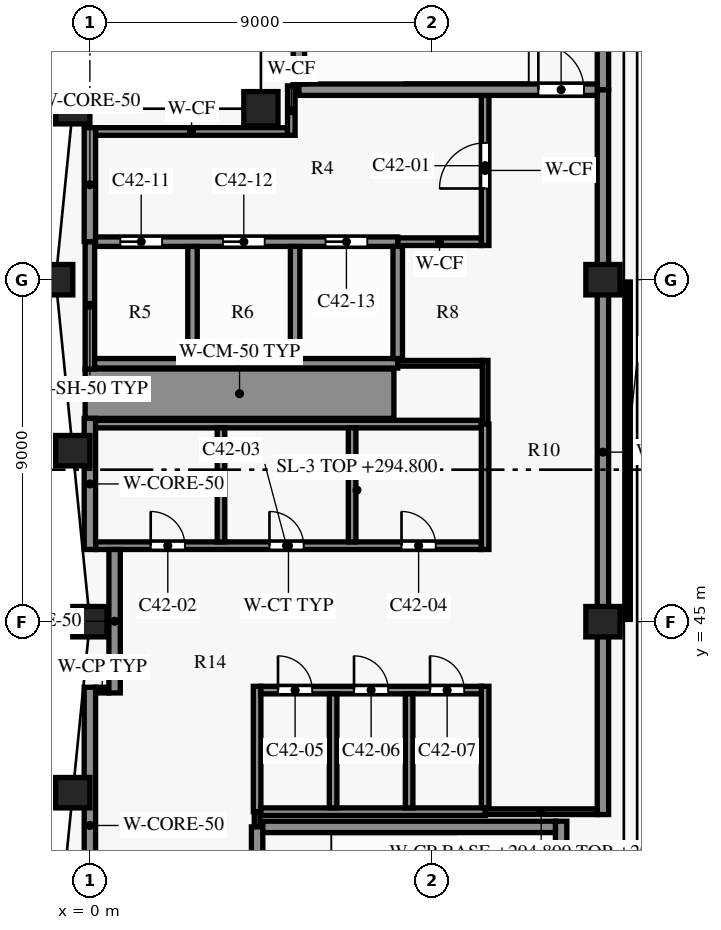
"""IFC4 building model, lengths in metres.
Left out: names, types, materials, properties, quantities, classifications, styles, units other than length and angle.
Written with IfcOpenShell. Run it as: python <this file> out.ifc"""

import sys

from ifc_helpers import new_model, si_unit, direction, frame, frame_2d, origin, origin_2d, place, context, subcontext, project, spatial, rectangle, extrude, element, fill, save


model = new_model("IFC4")
c1 = context("Model", 3, precision=1e-05, world=origin(), true_north=direction((0.0, 1.0)))
c2 = subcontext(c1, "Body", "Model", "MODEL_VIEW")
j1 = project(units=[si_unit("LENGTHUNIT", "METRE"), si_unit("PLANEANGLEUNIT", "RADIAN")], contexts=[c1])
p1 = place(None, origin())
s1 = spatial("IfcSite", under=j1, at=p1, CompositionType="ELEMENT")
p2 = place(p1, origin())
s2 = spatial("IfcBuilding", under=s1, at=p2, CompositionType="ELEMENT")
p3 = place(p2, frame((0.0, 0.0, 294.8)))
s3 = spatial("IfcBuildingStorey", under=s2, at=p3, CompositionType="ELEMENT", Elevation=294.8)
for number, where, z_axis, x_axis in (
    (1, (13.5, 45.0, 0.0), (0.0, 0.0, 1.0), (1.0, 0.0, 0.0)),
    (2, (13.5, 54.0, 0.0), (0.0, 0.0, 1.0), (1.0, 0.0, 0.0)),
    (3, (-0.45, 58.5, 0.0), (0.0, 0.0, 1.0), (-0.1, -0.995, 0.0)),
    (4, (-0.9, 54.0, 0.0), (0.0, 0.0, 1.0), (0.0, -1.0, 0.0)),
    (5, (-0.45, 49.5, 0.0), (0.0, 0.0, 1.0), (0.1, -0.995, 0.0)),
    (6, (0.0, 45.0, 0.0), (0.0, 0.0, 1.0), (0.0, -1.0, 0.0)),
    (7, (-0.45, 40.5, 0.0), (0.0, 0.0, 1.0), (-0.1, -0.995, 0.0)),
):
    element("IfcColumn", number, at=place(p3, frame(where, z_axis=z_axis, x_axis=x_axis)), inside=s3, PredefinedType="COLUMN", context=c2, shape_type="SweptSolid", body=[
        extrude(rectangle(XDim=0.9, YDim=0.8, at=origin_2d()), origin(), (0.0, 0.0, 1.0), 4.0),
    ])
p4 = place(p3, frame((4.5, 58.5, 0.0), z_axis=(0.0, 0.0, 1.0), x_axis=(1.0, 0.0, 0.0)))
e8 = element("IfcColumn", 8, at=p4, inside=s3, PredefinedType="COLUMN", context=c2, shape_type="SweptSolid", body=[
    extrude(rectangle(XDim=0.9, YDim=0.9, at=origin_2d()), origin(), (0.0, 0.0, 1.0), 4.0),
])
p5 = place(p3, frame((4.55, 39.6, 0.0), z_axis=(0.0, 0.0, 1.0), x_axis=(1.0, 0.0, 0.0)))
e9 = element("IfcWall", 9, at=p5, inside=s3, PredefinedType="SHEAR", context=c2, shape_type="SweptSolid", body=[
    extrude(rectangle(XDim=7.7, YDim=0.3, at=frame_2d((3.85, 0.0))), origin(), (0.0, 0.0, 1.0), 3.7),
])
p6 = place(p3, frame((10.4, 40.0, 0.0), z_axis=(0.0, 0.0, 1.0), x_axis=(1.0, 0.0, 0.0)))
e10 = element("IfcWall", 10, at=p6, inside=s3, PredefinedType="PARTITIONING", context=c2, shape_type="SweptSolid", body=[
    extrude(rectangle(XDim=2.95, YDim=0.15, at=frame_2d((1.475, 0.0))), origin(), (0.0, 0.0, 1.0), 3.35),
])
p7 = place(p3, frame((4.5, 40.0, 0.0), z_axis=(0.0, 0.0, 1.0), x_axis=(1.0, 0.0, 0.0)))
e11 = element("IfcWall", 11, at=p7, inside=s3, PredefinedType="PARTITIONING", context=c2, shape_type="SweptSolid", body=[
    extrude(rectangle(XDim=5.9, YDim=0.2, at=frame_2d((2.95, 0.0))), origin(), (0.0, 0.0, 1.0), 3.7),
])
p8 = place(p3, frame((0.15, 43.2, 0.0), z_axis=(0.0, 0.0, 1.0), x_axis=(1.0, 0.0, 0.0)))
e12 = element("IfcWall", 12, at=p8, inside=s3, PredefinedType="PARTITIONING", context=c2, shape_type="SweptSolid", body=[
    extrude(rectangle(XDim=0.35, YDim=0.15, at=frame_2d((0.175, 0.0))), origin(), (0.0, 0.0, 1.0), 3.7),
])
p9 = place(p3, frame((4.5, 43.2, 0.0), z_axis=(0.0, 0.0, 1.0), x_axis=(1.0, 0.0, 0.0)))
e13 = element("IfcWall", 13, at=p9, inside=s3, PredefinedType="PARTITIONING", context=c2, shape_type="SweptSolid", body=[
    extrude(rectangle(XDim=5.8, YDim=0.2, at=frame_2d((2.9, 0.0))), origin(), (0.0, 0.0, 1.0), 3.7),
])
p10 = place(p9, frame((0.45, 0.0, 0.0)))
e14 = element("IfcOpeningElement", 14, at=p10, cuts=e13, PredefinedType="OPENING", context=c2, shape_type="SweptSolid", body=[
    extrude(rectangle(XDim=0.9, YDim=2.1, at=frame_2d((0.45, 1.05))), frame((0.0, 0.11, 0.0), z_axis=(0.0, -1.0, 0.0), x_axis=(1.0, 0.0, 0.0)), (0.0, 0.0, 1.0), 0.22),
])
p11 = place(p9, frame((2.45, 0.0, 0.0)))
e15 = element("IfcOpeningElement", 15, at=p11, cuts=e13, PredefinedType="OPENING", context=c2, shape_type="SweptSolid", body=[
    extrude(rectangle(XDim=0.9, YDim=2.1, at=frame_2d((0.45, 1.05))), frame((0.0, 0.11, 0.0), z_axis=(0.0, -1.0, 0.0), x_axis=(1.0, 0.0, 0.0)), (0.0, 0.0, 1.0), 0.22),
])
p12 = place(p9, frame((4.45, 0.0, 0.0)))
e16 = element("IfcOpeningElement", 16, at=p12, cuts=e13, PredefinedType="OPENING", context=c2, shape_type="SweptSolid", body=[
    extrude(rectangle(XDim=0.9, YDim=2.1, at=frame_2d((0.45, 1.05))), frame((0.0, 0.11, 0.0), z_axis=(0.0, -1.0, 0.0), x_axis=(1.0, 0.0, 0.0)), (0.0, 0.0, 1.0), 0.22),
])
p13 = place(p3, frame((0.15, 47.0, 0.0), z_axis=(0.0, 0.0, 1.0), x_axis=(1.0, 0.0, 0.0)))
e17 = element("IfcWall", 17, at=p13, inside=s3, PredefinedType="PARTITIONING", context=c2, shape_type="SweptSolid", body=[
    extrude(rectangle(XDim=10.15, YDim=0.2, at=frame_2d((5.075, 0.0))), origin(), (0.0, 0.0, 1.0), 3.7),
])
p14 = place(p13, frame((1.45, 0.0, 0.0)))
e18 = element("IfcOpeningElement", 18, at=p14, cuts=e17, PredefinedType="OPENING", context=c2, shape_type="SweptSolid", body=[
    extrude(rectangle(XDim=0.9, YDim=2.1, at=frame_2d((0.45, 1.05))), frame((0.0, 0.11, 0.0), z_axis=(0.0, -1.0, 0.0), x_axis=(1.0, 0.0, 0.0)), (0.0, 0.0, 1.0), 0.22),
])
p15 = place(p13, frame((4.575, 0.0, 0.0)))
e19 = element("IfcOpeningElement", 19, at=p15, cuts=e17, PredefinedType="OPENING", context=c2, shape_type="SweptSolid", body=[
    extrude(rectangle(XDim=0.9, YDim=2.1, at=frame_2d((0.45, 1.05))), frame((0.0, 0.11, 0.0), z_axis=(0.0, -1.0, 0.0), x_axis=(1.0, 0.0, 0.0)), (0.0, 0.0, 1.0), 0.22),
])
p16 = place(p13, frame((8.05, 0.0, 0.0)))
e20 = element("IfcOpeningElement", 20, at=p16, cuts=e17, PredefinedType="OPENING", context=c2, shape_type="SweptSolid", body=[
    extrude(rectangle(XDim=0.9, YDim=2.1, at=frame_2d((0.45, 1.05))), frame((0.0, 0.11, 0.0), z_axis=(0.0, -1.0, 0.0), x_axis=(1.0, 0.0, 0.0)), (0.0, 0.0, 1.0), 0.22),
])
p17 = place(p3, frame((0.15, 50.2, 0.0), z_axis=(0.0, 0.0, 1.0), x_axis=(1.0, 0.0, 0.0)))
e21 = element("IfcWall", 21, at=p17, inside=s3, PredefinedType="PARTITIONING", context=c2, shape_type="SweptSolid", body=[
    extrude(rectangle(XDim=10.15, YDim=0.2, at=frame_2d((5.075, 0.0))), origin(), (0.0, 0.0, 1.0), 3.7),
])
p18 = place(p3, frame((-0.125, 51.0, 0.0), z_axis=(0.0, 0.0, 1.0), x_axis=(1.0, 0.0, 0.0)))
e22 = element("IfcWall", 22, at=p18, inside=s3, PredefinedType="SHEAR", context=c2, shape_type="SweptSolid", body=[
    extrude(rectangle(XDim=8.125, YDim=1.3, at=frame_2d((4.062, 0.0))), origin(), (0.0, 0.0, 1.0), 3.7),
])
p19 = place(p3, frame((8.1, 51.8, 0.0), z_axis=(0.0, 0.0, 1.0), x_axis=(1.0, 0.0, 0.0)))
e23 = element("IfcWall", 23, at=p19, inside=s3, PredefinedType="PARTITIONING", context=c2, shape_type="SweptSolid", body=[
    extrude(rectangle(XDim=2.225, YDim=0.15, at=frame_2d((1.112, 0.0))), origin(), (0.0, 0.0, 1.0), 3.7),
])
p20 = place(p3, frame((0.125, 51.8, 0.0), z_axis=(0.0, 0.0, 1.0), x_axis=(1.0, 0.0, 0.0)))
e24 = element("IfcWall", 24, at=p20, inside=s3, PredefinedType="SHEAR", context=c2, shape_type="SweptSolid", body=[
    extrude(rectangle(XDim=7.975, YDim=0.25, at=frame_2d((3.988, 0.0))), origin(), (0.0, 0.0, 1.0), 3.7),
])
p21 = place(p3, frame((8.1, 55.0, 0.0), z_axis=(0.0, 0.0, 1.0), x_axis=(1.0, 0.0, 0.0)))
e25 = element("IfcWall", 25, at=p21, inside=s3, PredefinedType="PARTITIONING", context=c2, shape_type="SweptSolid", body=[
    extrude(rectangle(XDim=2.2, YDim=0.2, at=frame_2d((1.1, 0.0))), origin(), (0.0, 0.0, 1.0), 3.7),
])
p22 = place(p3, frame((0.15, 55.0, 0.0), z_axis=(0.0, 0.0, 1.0), x_axis=(1.0, 0.0, 0.0)))
e26 = element("IfcWall", 26, at=p22, inside=s3, PredefinedType="SHEAR", context=c2, shape_type="SweptSolid", body=[
    extrude(rectangle(XDim=7.95, YDim=0.25, at=frame_2d((3.975, 0.0))), origin(), (0.0, 0.0, 1.0), 3.7),
])
p23 = place(p22, frame((0.65, 0.0, 0.0)))
e27 = element("IfcOpeningElement", 27, at=p23, cuts=e26, PredefinedType="OPENING", context=c2, shape_type="SweptSolid", body=[
    extrude(rectangle(XDim=1.1, YDim=2.1, at=frame_2d((0.55, 1.05))), frame((0.0, 0.135, 0.0), z_axis=(0.0, -1.0, 0.0), x_axis=(1.0, 0.0, 0.0)), (0.0, 0.0, 1.0), 0.27),
])
p24 = place(p22, frame((3.35, 0.0, 0.0)))
e28 = element("IfcOpeningElement", 28, at=p24, cuts=e26, PredefinedType="OPENING", context=c2, shape_type="SweptSolid", body=[
    extrude(rectangle(XDim=1.1, YDim=2.1, at=frame_2d((0.55, 1.05))), frame((0.0, 0.135, 0.0), z_axis=(0.0, -1.0, 0.0), x_axis=(1.0, 0.0, 0.0)), (0.0, 0.0, 1.0), 0.27),
])
p25 = place(p22, frame((6.05, 0.0, 0.0)))
e29 = element("IfcOpeningElement", 29, at=p25, cuts=e26, PredefinedType="OPENING", context=c2, shape_type="SweptSolid", body=[
    extrude(rectangle(XDim=1.1, YDim=2.1, at=frame_2d((0.55, 1.05))), frame((0.0, 0.135, 0.0), z_axis=(0.0, -1.0, 0.0), x_axis=(1.0, 0.0, 0.0)), (0.0, 0.0, 1.0), 0.27),
])
p26 = place(p3, frame((0.15, 57.9, 0.0), z_axis=(0.0, 0.0, 1.0), x_axis=(1.0, 0.0, 0.0)))
e30 = element("IfcWall", 30, at=p26, inside=s3, PredefinedType="PARTITIONING", context=c2, shape_type="SweptSolid", body=[
    extrude(rectangle(XDim=5.05, YDim=0.2, at=frame_2d((2.525, 0.0))), origin(), (0.0, 0.0, 1.0), 3.7),
])
p27 = place(p3, frame((5.5, 59.0, 0.0), z_axis=(0.0, 0.0, 1.0), x_axis=(1.0, 0.0, 0.0)))
e31 = element("IfcWall", 31, at=p27, inside=s3, PredefinedType="SHEAR", context=c2, shape_type="SweptSolid", body=[
    extrude(rectangle(XDim=7.85, YDim=0.3, at=frame_2d((3.925, 0.0))), origin(), (0.0, 0.0, 1.0), 3.7),
])
p28 = place(p27, frame((6.3, 0.0, 0.0)))
e32 = element("IfcOpeningElement", 32, at=p28, cuts=e31, PredefinedType="OPENING", context=c2, shape_type="SweptSolid", body=[
    extrude(rectangle(XDim=1.2, YDim=2.2, at=frame_2d((0.6, 1.1))), frame((0.0, 0.16, 0.0), z_axis=(0.0, -1.0, 0.0), x_axis=(1.0, 0.0, 0.0)), (0.0, 0.0, 1.0), 0.32),
])
p29 = place(p3, frame((0.0, 36.0, 0.0), z_axis=(0.0, 0.0, 1.0), x_axis=(0.0, 1.0, 0.0)))
e33 = element("IfcWall", 33, at=p29, inside=s3, PredefinedType="SHEAR", context=c2, shape_type="SweptSolid", body=[
    extrude(rectangle(XDim=7.275, YDim=0.3, at=frame_2d((3.637, 0.0))), origin(), (0.0, 0.0, 1.0), 3.7),
])
p30 = place(p3, frame((0.0, 46.9, 0.0), z_axis=(0.0, 0.0, 1.0), x_axis=(0.0, 1.0, 0.0)))
e34 = element("IfcWall", 34, at=p30, inside=s3, PredefinedType="SHEAR", context=c2, shape_type="SweptSolid", body=[
    extrude(rectangle(XDim=3.45, YDim=0.3, at=frame_2d((1.725, 0.0))), origin(), (0.0, 0.0, 1.0), 3.7),
])
p31 = place(p3, frame((0.0, 55.0, 0.0), z_axis=(0.0, 0.0, 1.0), x_axis=(0.0, 1.0, 0.0)))
e35 = element("IfcWall", 35, at=p31, inside=s3, PredefinedType="SHEAR", context=c2, shape_type="SweptSolid", body=[
    extrude(rectangle(XDim=3.0, YDim=0.3, at=frame_2d((1.5, 0.0))), origin(), (0.0, 0.0, 1.0), 3.7),
])
p32 = place(p3, frame((0.0, 51.65, 0.0), z_axis=(0.0, 0.0, 1.0), x_axis=(0.0, 1.0, 0.0)))
e36 = element("IfcWall", 36, at=p32, inside=s3, PredefinedType="SHEAR", context=c2, shape_type="SweptSolid", body=[
    extrude(rectangle(XDim=3.35, YDim=0.25, at=frame_2d((1.675, 0.0))), origin(), (0.0, 0.0, 1.0), 3.7),
])
p33 = place(p3, frame((0.65, 43.125, 0.0), z_axis=(0.0, 0.0, 1.0), x_axis=(0.0, 1.0, 0.0)))
e37 = element("IfcWall", 37, at=p33, inside=s3, PredefinedType="SHEAR", context=c2, shape_type="SweptSolid", body=[
    extrude(rectangle(XDim=3.775, YDim=0.3, at=frame_2d((1.887, 0.0))), origin(), (0.0, 0.0, 1.0), 3.7),
])
p34 = place(p3, frame((2.7, 51.925, 0.0), z_axis=(0.0, 0.0, 1.0), x_axis=(0.0, 1.0, 0.0)))
e38 = element("IfcWall", 38, at=p34, inside=s3, PredefinedType="SHEAR", context=c2, shape_type="SweptSolid", body=[
    extrude(rectangle(XDim=2.95, YDim=0.25, at=frame_2d((1.475, 0.0))), origin(), (0.0, 0.0, 1.0), 3.7),
])
p35 = place(p3, frame((3.45, 47.1, 0.0), z_axis=(0.0, 0.0, 1.0), x_axis=(0.0, 1.0, 0.0)))
e39 = element("IfcWall", 39, at=p35, inside=s3, PredefinedType="PARTITIONING", context=c2, shape_type="SweptSolid", body=[
    extrude(rectangle(XDim=3.0, YDim=0.2, at=frame_2d((1.5, 0.0))), origin(), (0.0, 0.0, 1.0), 3.7),
])
p36 = place(p3, frame((4.4, 39.6, 0.0), z_axis=(0.0, 0.0, 1.0), x_axis=(0.0, 1.0, 0.0)))
e40 = element("IfcWall", 40, at=p36, inside=s3, PredefinedType="PARTITIONING", context=c2, shape_type="SweptSolid", body=[
    extrude(rectangle(XDim=0.4, YDim=0.15, at=frame_2d((0.2, 0.0))), origin(), (0.0, 0.0, 1.0), 3.7),
])
p37 = place(p3, frame((4.4, 40.0, 0.0), z_axis=(0.0, 0.0, 1.0), x_axis=(0.0, 1.0, 0.0)))
e41 = element("IfcWall", 41, at=p37, inside=s3, PredefinedType="PARTITIONING", context=c2, shape_type="SweptSolid", body=[
    extrude(rectangle(XDim=3.3, YDim=0.2, at=frame_2d((1.65, 0.0))), origin(), (0.0, 0.0, 1.0), 3.7),
])
p38 = place(p3, frame((4.4, 35.85, 0.0), z_axis=(0.0, 0.0, 1.0), x_axis=(0.0, 1.0, 0.0)))
e42 = element("IfcWall", 42, at=p38, inside=s3, PredefinedType="SHEAR", context=c2, shape_type="SweptSolid", body=[
    extrude(rectangle(XDim=3.75, YDim=0.3, at=frame_2d((1.875, 0.0))), origin(), (0.0, 0.0, 1.0), 3.7),
])
p39 = place(p3, frame((5.3, 57.8, 0.0), z_axis=(0.0, 0.0, 1.0), x_axis=(0.0, 1.0, 0.0)))
e43 = element("IfcWall", 43, at=p39, inside=s3, PredefinedType="PARTITIONING", context=c2, shape_type="SweptSolid", body=[
    extrude(rectangle(XDim=1.3, YDim=0.2, at=frame_2d((0.65, 0.0))), origin(), (0.0, 0.0, 1.0), 3.7),
])
p40 = place(p3, frame((5.4, 51.925, 0.0), z_axis=(0.0, 0.0, 1.0), x_axis=(0.0, 1.0, 0.0)))
e44 = element("IfcWall", 44, at=p40, inside=s3, PredefinedType="SHEAR", context=c2, shape_type="SweptSolid", body=[
    extrude(rectangle(XDim=2.95, YDim=0.25, at=frame_2d((1.475, 0.0))), origin(), (0.0, 0.0, 1.0), 3.7),
])
p41 = place(p3, frame((5.5, 59.15, 0.0), z_axis=(0.0, 0.0, 1.0), x_axis=(0.0, 1.0, 0.0)))
e45 = element("IfcWall", 45, at=p41, inside=s3, PredefinedType="SHEAR", context=c2, shape_type="SweptSolid", body=[
    extrude(rectangle(XDim=3.6, YDim=0.3, at=frame_2d((1.8, 0.0))), origin(), (0.0, 0.0, 1.0), 3.7),
])
for number, where, z_axis, x_axis in (
    (46, (6.4, 40.1, 0.0), (0.0, 0.0, 1.0), (0.0, 1.0, 0.0)),
    (47, (6.9, 47.1, 0.0), (0.0, 0.0, 1.0), (0.0, 1.0, 0.0)),
):
    element("IfcWall", number, at=place(p3, frame(where, z_axis=z_axis, x_axis=x_axis)), inside=s3, PredefinedType="PARTITIONING", context=c2, shape_type="SweptSolid", body=[
        extrude(rectangle(XDim=3.0, YDim=0.2, at=frame_2d((1.5, 0.0))), origin(), (0.0, 0.0, 1.0), 3.7),
    ])
p42 = place(p3, frame((8.1, 51.925, 0.0), z_axis=(0.0, 0.0, 1.0), x_axis=(0.0, 1.0, 0.0)))
e48 = element("IfcWall", 48, at=p42, inside=s3, PredefinedType="SHEAR", context=c2, shape_type="SweptSolid", body=[
    extrude(rectangle(XDim=2.95, YDim=0.25, at=frame_2d((1.475, 0.0))), origin(), (0.0, 0.0, 1.0), 3.7),
])
p43 = place(p3, frame((8.4, 40.1, 0.0), z_axis=(0.0, 0.0, 1.0), x_axis=(0.0, 1.0, 0.0)))
e49 = element("IfcWall", 49, at=p43, inside=s3, PredefinedType="PARTITIONING", context=c2, shape_type="SweptSolid", body=[
    extrude(rectangle(XDim=3.0, YDim=0.2, at=frame_2d((1.5, 0.0))), origin(), (0.0, 0.0, 1.0), 3.7),
])
p44 = place(p3, frame((10.4, 54.9, 0.0), z_axis=(0.0, 0.0, 1.0), x_axis=(0.0, 1.0, 0.0)))
e50 = element("IfcWall", 50, at=p44, inside=s3, PredefinedType="PARTITIONING", context=c2, shape_type="SweptSolid", body=[
    extrude(rectangle(XDim=3.95, YDim=0.2, at=frame_2d((1.975, 0.0))), origin(), (0.0, 0.0, 1.0), 3.7),
])
p45 = place(p44, frame((1.5, 0.0, 0.0)))
e51 = element("IfcOpeningElement", 51, at=p45, cuts=e50, PredefinedType="OPENING", context=c2, shape_type="SweptSolid", body=[
    extrude(rectangle(XDim=1.2, YDim=2.2, at=frame_2d((0.6, 1.1))), frame((0.0, 0.11, 0.0), z_axis=(0.0, -1.0, 0.0), x_axis=(1.0, 0.0, 0.0)), (0.0, 0.0, 1.0), 0.22),
])
p46 = place(p3, frame((10.4, 50.2, 0.0), z_axis=(0.0, 0.0, 1.0), x_axis=(0.0, 1.0, 0.0)))
e52 = element("IfcWall", 52, at=p46, inside=s3, PredefinedType="PARTITIONING", context=c2, shape_type="SweptSolid", body=[
    extrude(rectangle(XDim=1.675, YDim=0.15, at=frame_2d((0.837, 0.0))), origin(), (0.0, 0.0, 1.0), 3.7),
])
p47 = place(p3, frame((10.4, 40.1, 0.0), z_axis=(0.0, 0.0, 1.0), x_axis=(0.0, 1.0, 0.0)))
e53 = element("IfcWall", 53, at=p47, inside=s3, PredefinedType="PARTITIONING", context=c2, shape_type="SweptSolid", body=[
    extrude(rectangle(XDim=3.2, YDim=0.2, at=frame_2d((1.6, 0.0))), origin(), (0.0, 0.0, 1.0), 3.7),
])
p48 = place(p3, frame((10.4, 46.9, 0.0), z_axis=(0.0, 0.0, 1.0), x_axis=(0.0, 1.0, 0.0)))
e54 = element("IfcWall", 54, at=p48, inside=s3, PredefinedType="PARTITIONING", context=c2, shape_type="SweptSolid", body=[
    extrude(rectangle(XDim=3.3, YDim=0.2, at=frame_2d((1.65, 0.0))), origin(), (0.0, 0.0, 1.0), 3.7),
])
p49 = place(p3, frame((12.4, 35.85, 0.0), z_axis=(0.0, 0.0, 1.0), x_axis=(0.0, 1.0, 0.0)))
e55 = element("IfcWall", 55, at=p49, inside=s3, PredefinedType="SHEAR", context=c2, shape_type="SweptSolid", body=[
    extrude(rectangle(XDim=3.9, YDim=0.3, at=frame_2d((1.95, 0.0))), origin(), (0.0, 0.0, 1.0), 3.7),
])
p50 = place(p3, frame((13.5, 39.925, 0.0), z_axis=(0.0, 0.0, 1.0), x_axis=(0.0, 1.0, 0.0)))
e56 = element("IfcWall", 56, at=p50, inside=s3, PredefinedType="SHEAR", context=c2, shape_type="SweptSolid", body=[
    extrude(rectangle(XDim=19.075, YDim=0.3, at=frame_2d((9.538, 0.0))), origin(), (0.0, 0.0, 1.0), 3.7),
])
p51 = place(p3, frame((13.5, 59.0, 0.0), z_axis=(0.0, 0.0, 1.0), x_axis=(0.0, 1.0, 0.0)))
e57 = element("IfcWall", 57, at=p51, inside=s3, PredefinedType="SHEAR", context=c2, shape_type="SweptSolid", body=[
    extrude(rectangle(XDim=4.048, YDim=0.3, at=frame_2d((2.024, 0.0))), origin(), (0.0, 0.0, 1.0), 3.7),
])
p52 = place(p45, origin())
e58 = element("IfcDoor", 58, at=p52, inside=s3, OperationType="SINGLE_SWING_RIGHT", PredefinedType="DOOR", context=c2, shape_type="SweptSolid", body=[
    extrude(rectangle(XDim=1.2, YDim=2.2, at=frame_2d((0.6, 1.1))), frame((0.0, 0.025, 0.0), z_axis=(0.0, -1.0, 0.0), x_axis=(1.0, 0.0, 0.0)), (0.0, 0.0, 1.0), 0.05),
])
fill(e51, e58)
p53 = place(p14, origin())
e59 = element("IfcDoor", 59, at=p53, inside=s3, OperationType="SINGLE_SWING_RIGHT", PredefinedType="DOOR", context=c2, shape_type="SweptSolid", body=[
    extrude(rectangle(XDim=0.9, YDim=2.1, at=frame_2d((0.45, 1.05))), frame((0.0, 0.025, 0.0), z_axis=(0.0, -1.0, 0.0), x_axis=(1.0, 0.0, 0.0)), (0.0, 0.0, 1.0), 0.05),
])
fill(e18, e59)
p54 = place(p15, origin())
e60 = element("IfcDoor", 60, at=p54, inside=s3, OperationType="SINGLE_SWING_LEFT", PredefinedType="DOOR", context=c2, shape_type="SweptSolid", body=[
    extrude(rectangle(XDim=0.9, YDim=2.1, at=frame_2d((0.45, 1.05))), frame((0.0, 0.025, 0.0), z_axis=(0.0, -1.0, 0.0), x_axis=(1.0, 0.0, 0.0)), (0.0, 0.0, 1.0), 0.05),
])
fill(e19, e60)
p55 = place(p16, origin())
e61 = element("IfcDoor", 61, at=p55, inside=s3, OperationType="SINGLE_SWING_RIGHT", PredefinedType="DOOR", context=c2, shape_type="SweptSolid", body=[
    extrude(rectangle(XDim=0.9, YDim=2.1, at=frame_2d((0.45, 1.05))), frame((0.0, 0.025, 0.0), z_axis=(0.0, -1.0, 0.0), x_axis=(1.0, 0.0, 0.0)), (0.0, 0.0, 1.0), 0.05),
])
fill(e20, e61)
p56 = place(p10, origin())
e62 = element("IfcDoor", 62, at=p56, inside=s3, OperationType="SINGLE_SWING_LEFT", PredefinedType="DOOR", context=c2, shape_type="SweptSolid", body=[
    extrude(rectangle(XDim=0.9, YDim=2.1, at=frame_2d((0.45, 1.05))), frame((0.0, 0.025, 0.0), z_axis=(0.0, -1.0, 0.0), x_axis=(1.0, 0.0, 0.0)), (0.0, 0.0, 1.0), 0.05),
])
fill(e14, e62)
p57 = place(p11, origin())
e63 = element("IfcDoor", 63, at=p57, inside=s3, OperationType="SINGLE_SWING_RIGHT", PredefinedType="DOOR", context=c2, shape_type="SweptSolid", body=[
    extrude(rectangle(XDim=0.9, YDim=2.1, at=frame_2d((0.45, 1.05))), frame((0.0, 0.025, 0.0), z_axis=(0.0, -1.0, 0.0), x_axis=(1.0, 0.0, 0.0)), (0.0, 0.0, 1.0), 0.05),
])
fill(e15, e63)
p58 = place(p12, origin())
e64 = element("IfcDoor", 64, at=p58, inside=s3, OperationType="SINGLE_SWING_LEFT", PredefinedType="DOOR", context=c2, shape_type="SweptSolid", body=[
    extrude(rectangle(XDim=0.9, YDim=2.1, at=frame_2d((0.45, 1.05))), frame((0.0, 0.025, 0.0), z_axis=(0.0, -1.0, 0.0), x_axis=(1.0, 0.0, 0.0)), (0.0, 0.0, 1.0), 0.05),
])
fill(e16, e64)
p59 = place(p28, origin())
e65 = element("IfcDoor", 65, at=p59, inside=s3, OperationType="SINGLE_SWING_RIGHT", PredefinedType="DOOR", context=c2, shape_type="SweptSolid", body=[
    extrude(rectangle(XDim=1.2, YDim=2.2, at=frame_2d((0.6, 1.1))), frame((0.0, 0.025, 0.0), z_axis=(0.0, -1.0, 0.0), x_axis=(1.0, 0.0, 0.0)), (0.0, 0.0, 1.0), 0.05),
])
fill(e32, e65)
p60 = place(p23, origin())
e66 = element("IfcDoor", 66, at=p60, inside=s3, OperationType="DOUBLE_DOOR_SLIDING", PredefinedType="DOOR", context=c2, shape_type="SweptSolid", body=[
    extrude(rectangle(XDim=1.1, YDim=2.1, at=frame_2d((0.55, 1.05))), frame((0.0, 0.025, 0.0), z_axis=(0.0, -1.0, 0.0), x_axis=(1.0, 0.0, 0.0)), (0.0, 0.0, 1.0), 0.05),
])
fill(e27, e66)
p61 = place(p24, origin())
e67 = element("IfcDoor", 67, at=p61, inside=s3, OperationType="DOUBLE_DOOR_SLIDING", PredefinedType="DOOR", context=c2, shape_type="SweptSolid", body=[
    extrude(rectangle(XDim=1.1, YDim=2.1, at=frame_2d((0.55, 1.05))), frame((0.0, 0.025, 0.0), z_axis=(0.0, -1.0, 0.0), x_axis=(1.0, 0.0, 0.0)), (0.0, 0.0, 1.0), 0.05),
])
fill(e28, e67)
p62 = place(p25, origin())
e68 = element("IfcDoor", 68, at=p62, inside=s3, OperationType="DOUBLE_DOOR_SLIDING", PredefinedType="DOOR", context=c2, shape_type="SweptSolid", body=[
    extrude(rectangle(XDim=1.1, YDim=2.1, at=frame_2d((0.55, 1.05))), frame((0.0, 0.025, 0.0), z_axis=(0.0, -1.0, 0.0), x_axis=(1.0, 0.0, 0.0)), (0.0, 0.0, 1.0), 0.05),
])
fill(e29, e68)
save(model, sys.argv[1])
